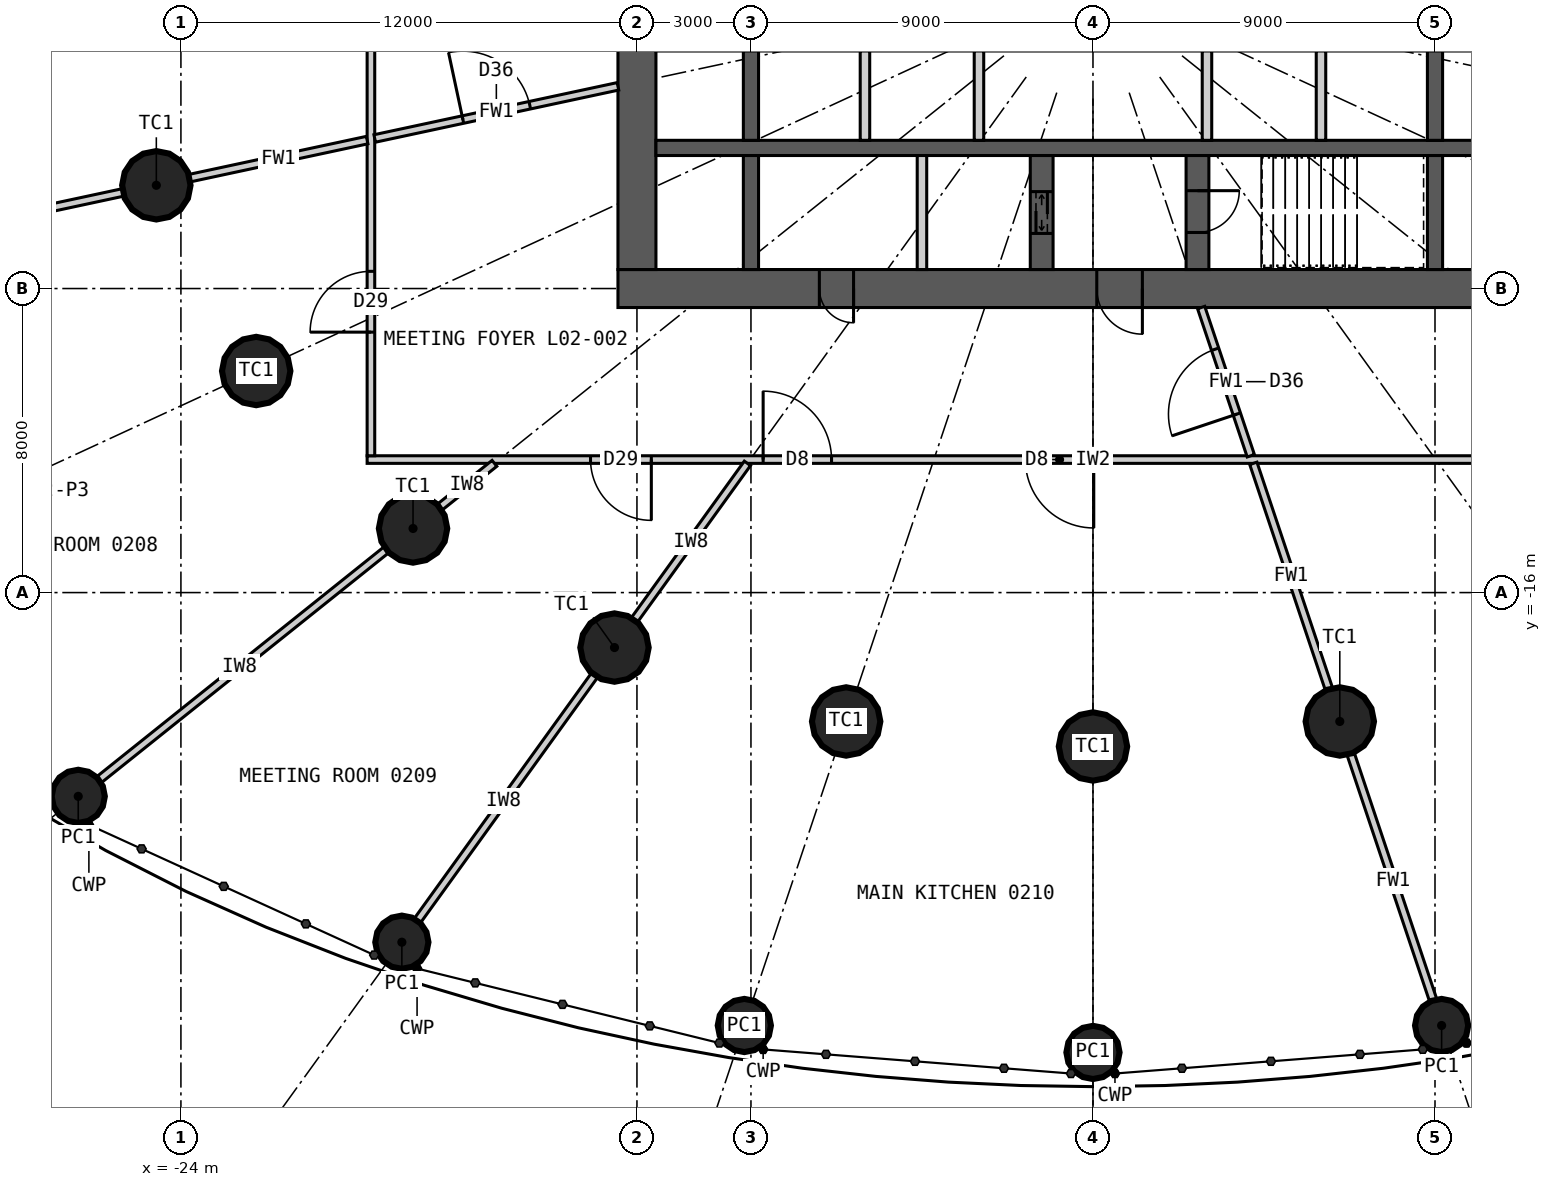
"""IFC4 building model, lengths in metres.
Left out: names, types, materials, properties, quantities, classifications, styles, units other than length and angle.
Written with IfcOpenShell. Run it as: python <this file> out.ifc"""

import sys

from ifc_helpers import new_model, si_unit, direction, frame, frame_2d, origin, origin_2d, place, context, subcontext, project, spatial, rectangle, circle, extrude, element, fill, save


model = new_model("IFC4")
c1 = context("Model", 3, precision=1e-05, world=origin(), true_north=direction((0.0, 1.0)))
c2 = subcontext(c1, "Body", "Model", "MODEL_VIEW")
j1 = project(units=[si_unit("LENGTHUNIT", "METRE"), si_unit("PLANEANGLEUNIT", "RADIAN")], contexts=[c1])
p1 = place(None, origin())
s1 = spatial("IfcSite", under=j1, at=p1, CompositionType="ELEMENT")
p2 = place(p1, origin())
s2 = spatial("IfcBuilding", under=s1, at=p2, CompositionType="ELEMENT")
p3 = place(p2, frame((0.0, 0.0, 13.8)))
s3 = spatial("IfcBuildingStorey", under=s2, at=p3, CompositionType="ELEMENT", Elevation=13.8)
for number, where, z_axis, x_axis in (
    (1, (-24.647, -5.283, 0.0), (0.0, 0.0, 1.0), (1.0, 0.0, 0.0)),
    (2, (-22.019, -10.17, 0.0), (0.0, 0.0, 1.0), (1.0, 0.0, 0.0)),
    (3, (-17.892, -14.313, 0.0), (0.0, 0.0, 1.0), (1.0, 0.0, 0.0)),
    (4, (-12.591, -17.447, 0.0), (0.0, 0.0, 1.0), (1.0, 0.0, 0.0)),
    (5, (-6.495, -19.391, 0.0), (0.0, 0.0, 1.0), (1.0, 0.0, 0.0)),
    (6, (0.0, -20.05, 0.0), (0.0, 0.0, 1.0), (1.0, 0.0, 0.0)),
    (7, (6.495, -19.391, 0.0), (0.0, 0.0, 1.0), (1.0, 0.0, 0.0)),
):
    element("IfcColumn", number, at=place(p3, frame(where, z_axis=z_axis, x_axis=x_axis)), inside=s3, PredefinedType="COLUMN", context=c2, shape_type="SweptSolid", body=[
        extrude(circle(Radius=0.9, at=origin_2d()), origin(), (0.0, 0.0, 1.0), 5.4),
    ])
for number, where, z_axis, x_axis in (
    (8, (-26.702, -21.362, 0.0), (0.0, 0.0, 1.0), (1.0, 0.0, 0.0)),
    (9, (-18.186, -25.199, 0.0), (0.0, 0.0, 1.0), (1.0, 0.0, 0.0)),
    (10, (-9.174, -27.391, 0.0), (0.0, 0.0, 1.0), (1.0, 0.0, 0.0)),
    (11, (0.0, -28.1, 0.0), (0.0, 0.0, 1.0), (1.0, 0.0, 0.0)),
    (12, (9.174, -27.391, 0.0), (0.0, 0.0, 1.0), (1.0, 0.0, 0.0)),
):
    element("IfcColumn", number, at=place(p3, frame(where, z_axis=z_axis, x_axis=x_axis)), inside=s3, PredefinedType="COLUMN", context=c2, shape_type="SweptSolid", body=[
        extrude(circle(Radius=0.7, at=origin_2d()), origin(), (0.0, 0.0, 1.0), 5.4),
    ])
p4 = place(p3, frame((12.5, -8.0, 0.0), z_axis=(0.0, 0.0, 1.0), x_axis=(-1.0, 0.0, 0.0)))
e13 = element("IfcWall", 13, at=p4, inside=s3, PredefinedType="SHEAR", context=c2, shape_type="SweptSolid", body=[
    extrude(rectangle(XDim=25.0, YDim=1.0, at=frame_2d((12.5, 0.0))), origin(), (0.0, 0.0, 1.0), 5.4),
])
p5 = place(p4, frame((11.2, 0.0, 0.0)))
e14 = element("IfcOpeningElement", 14, at=p5, cuts=e13, PredefinedType="OPENING", context=c2, shape_type="SweptSolid", body=[
    extrude(rectangle(XDim=1.2, YDim=2.2, at=frame_2d((0.6, 1.1))), frame((0.0, 0.51, 0.0), z_axis=(0.0, -1.0, 0.0), x_axis=(1.0, 0.0, 0.0)), (0.0, 0.0, 1.0), 1.02),
])
p6 = place(p4, frame((18.8, 0.0, 0.0)))
e15 = element("IfcOpeningElement", 15, at=p6, cuts=e13, PredefinedType="OPENING", context=c2, shape_type="SweptSolid", body=[
    extrude(rectangle(XDim=0.9, YDim=2.2, at=frame_2d((0.45, 1.1))), frame((0.0, 0.51, 0.0), z_axis=(0.0, -1.0, 0.0), x_axis=(1.0, 0.0, 0.0)), (0.0, 0.0, 1.0), 1.02),
])
p7 = place(p3, frame((-12.0, 7.5, 0.0), z_axis=(0.0, 0.0, 1.0), x_axis=(0.0, -1.0, 0.0)))
e16 = element("IfcWall", 16, at=p7, inside=s3, PredefinedType="SHEAR", context=c2, shape_type="SweptSolid", body=[
    extrude(rectangle(XDim=15.0, YDim=1.0, at=frame_2d((7.5, 0.0))), origin(), (0.0, 0.0, 1.0), 5.4),
])
p8 = place(p7, frame((6.6, 0.0, 0.0)))
e17 = element("IfcOpeningElement", 17, at=p8, cuts=e16, PredefinedType="OPENING", context=c2, shape_type="SweptSolid", body=[
    extrude(rectangle(XDim=1.8, YDim=2.2, at=frame_2d((0.9, 1.1))), frame((0.0, 0.51, 0.0), z_axis=(0.0, -1.0, 0.0), x_axis=(1.0, 0.0, 0.0)), (0.0, 0.0, 1.0), 1.02),
])
p9 = place(p3, frame((-11.5, -4.3, 0.0), z_axis=(0.0, 0.0, 1.0), x_axis=(1.0, 0.0, 0.0)))
e18 = element("IfcWall", 18, at=p9, inside=s3, PredefinedType="SHEAR", context=c2, shape_type="SweptSolid", body=[
    extrude(rectangle(XDim=23.0, YDim=0.4, at=frame_2d((11.5, 0.0))), origin(), (0.0, 0.0, 1.0), 5.4),
])
p10 = place(p3, frame((-9.0, -4.1, 0.0), z_axis=(0.0, 0.0, 1.0), x_axis=(0.0, 1.0, 0.0)))
e19 = element("IfcWall", 19, at=p10, inside=s3, PredefinedType="SHEAR", context=c2, shape_type="SweptSolid", body=[
    extrude(rectangle(XDim=2.35, YDim=0.4, at=frame_2d((1.175, 0.0))), origin(), (0.0, 0.0, 1.0), 5.4),
])
p11 = place(p3, frame((-9.0, -7.5, 0.0), z_axis=(0.0, 0.0, 1.0), x_axis=(0.0, 1.0, 0.0)))
e20 = element("IfcWall", 20, at=p11, inside=s3, PredefinedType="SHEAR", context=c2, shape_type="SweptSolid", body=[
    extrude(rectangle(XDim=3.0, YDim=0.4, at=frame_2d((1.5, 0.0))), origin(), (0.0, 0.0, 1.0), 5.4),
])
p12 = place(p3, frame((9.0, -4.1, 0.0), z_axis=(0.0, 0.0, 1.0), x_axis=(0.0, 1.0, 0.0)))
e21 = element("IfcWall", 21, at=p12, inside=s3, PredefinedType="SHEAR", context=c2, shape_type="SweptSolid", body=[
    extrude(rectangle(XDim=2.35, YDim=0.4, at=frame_2d((1.175, 0.0))), origin(), (0.0, 0.0, 1.0), 5.4),
])
p13 = place(p3, frame((9.0, -7.5, 0.0), z_axis=(0.0, 0.0, 1.0), x_axis=(0.0, 1.0, 0.0)))
e22 = element("IfcWall", 22, at=p13, inside=s3, PredefinedType="SHEAR", context=c2, shape_type="SweptSolid", body=[
    extrude(rectangle(XDim=3.0, YDim=0.4, at=frame_2d((1.5, 0.0))), origin(), (0.0, 0.0, 1.0), 5.4),
])
p14 = place(p3, frame((2.75, -7.5, 0.0), z_axis=(0.0, 0.0, 1.0), x_axis=(0.0, 1.0, 0.0)))
e23 = element("IfcWall", 23, at=p14, inside=s3, PredefinedType="SHEAR", context=c2, shape_type="SweptSolid", body=[
    extrude(rectangle(XDim=3.0, YDim=0.6, at=frame_2d((1.5, 0.0))), origin(), (0.0, 0.0, 1.0), 5.4),
])
p15 = place(p14, frame((0.975, 0.0, 0.0)))
e24 = element("IfcOpeningElement", 24, at=p15, cuts=e23, PredefinedType="OPENING", context=c2, shape_type="SweptSolid", body=[
    extrude(rectangle(XDim=1.1, YDim=2.2, at=frame_2d((0.55, 1.1))), frame((0.0, 0.31, 0.0), z_axis=(0.0, -1.0, 0.0), x_axis=(1.0, 0.0, 0.0)), (0.0, 0.0, 1.0), 0.62),
])
p16 = place(p3, frame((-1.35, -7.5, 0.0), z_axis=(0.0, 0.0, 1.0), x_axis=(0.0, 1.0, 0.0)))
e25 = element("IfcWall", 25, at=p16, inside=s3, PredefinedType="SHEAR", context=c2, shape_type="SweptSolid", body=[
    extrude(rectangle(XDim=3.0, YDim=0.6, at=frame_2d((1.5, 0.0))), origin(), (0.0, 0.0, 1.0), 5.4),
])
p17 = place(p16, frame((0.95, 0.0, 0.0)))
e26 = element("IfcOpeningElement", 26, at=p17, cuts=e25, PredefinedType="OPENING", context=c2, shape_type="SweptSolid", body=[
    extrude(rectangle(XDim=1.1, YDim=2.2, at=frame_2d((0.55, 1.1))), frame((0.0, 0.31, 0.0), z_axis=(0.0, -1.0, 0.0), x_axis=(1.0, 0.0, 0.0)), (0.0, 0.0, 1.0), 0.62),
])
p18 = place(p3, frame((-4.5, -7.5, 0.0), z_axis=(0.0, 0.0, 1.0), x_axis=(0.0, 1.0, 0.0)))
e27 = element("IfcWall", 27, at=p18, inside=s3, PredefinedType="PARTITIONING", context=c2, shape_type="SweptSolid", body=[
    extrude(rectangle(XDim=3.0, YDim=0.25, at=frame_2d((1.5, 0.0))), origin(), (0.0, 0.0, 1.0), 5.4),
])
for number, where, z_axis, x_axis in (
    (28, (-6.0, -4.1, 0.0), (0.0, 0.0, 1.0), (0.0, 1.0, 0.0)),
    (29, (-3.0, -4.1, 0.0), (0.0, 0.0, 1.0), (0.0, 1.0, 0.0)),
    (30, (3.0, -4.1, 0.0), (0.0, 0.0, 1.0), (0.0, 1.0, 0.0)),
    (31, (6.0, -4.1, 0.0), (0.0, 0.0, 1.0), (0.0, 1.0, 0.0)),
):
    element("IfcWall", number, at=place(p3, frame(where, z_axis=z_axis, x_axis=x_axis)), inside=s3, PredefinedType="PARTITIONING", context=c2, shape_type="SweptSolid", body=[
        extrude(rectangle(XDim=2.35, YDim=0.25, at=frame_2d((1.175, 0.0))), origin(), (0.0, 0.0, 1.0), 5.4),
    ])
p19 = place(p3, frame((19.1, -12.5, 0.0), z_axis=(0.0, 0.0, 1.0), x_axis=(-1.0, 0.0, 0.0)))
e32 = element("IfcWall", 32, at=p19, inside=s3, PredefinedType="PARTITIONING", context=c2, shape_type="SweptSolid", body=[
    extrude(rectangle(XDim=38.2, YDim=0.2, at=frame_2d((19.1, 0.0))), origin(), (0.0, 0.0, 1.0), 5.15),
])
p20 = place(p19, frame((30.722, 0.0, 0.0)))
e33 = element("IfcOpeningElement", 33, at=p20, cuts=e32, PredefinedType="OPENING", context=c2, shape_type="SweptSolid", body=[
    extrude(rectangle(XDim=1.6, YDim=2.4, at=frame_2d((0.8, 1.2))), frame((0.0, 0.11, 0.0), z_axis=(0.0, -1.0, 0.0), x_axis=(1.0, 0.0, 0.0)), (0.0, 0.0, 1.0), 0.22),
])
p21 = place(p19, frame((19.079, 0.0, 0.0)))
e34 = element("IfcOpeningElement", 34, at=p21, cuts=e32, PredefinedType="OPENING", context=c2, shape_type="SweptSolid", body=[
    extrude(rectangle(XDim=1.8, YDim=2.4, at=frame_2d((0.9, 1.2))), frame((0.0, 0.11, 0.0), z_axis=(0.0, -1.0, 0.0), x_axis=(1.0, 0.0, 0.0)), (0.0, 0.0, 1.0), 0.22),
])
p22 = place(p19, frame((25.979, 0.0, 0.0)))
e35 = element("IfcOpeningElement", 35, at=p22, cuts=e32, PredefinedType="OPENING", context=c2, shape_type="SweptSolid", body=[
    extrude(rectangle(XDim=1.8, YDim=2.4, at=frame_2d((0.9, 1.2))), frame((0.0, 0.11, 0.0), z_axis=(0.0, -1.0, 0.0), x_axis=(1.0, 0.0, 0.0)), (0.0, 0.0, 1.0), 0.22),
])
p23 = place(p3, frame((-19.0, 12.4, 0.0), z_axis=(0.0, 0.0, 1.0), x_axis=(0.0, -1.0, 0.0)))
e36 = element("IfcWall", 36, at=p23, inside=s3, PredefinedType="PARTITIONING", context=c2, shape_type="SweptSolid", body=[
    extrude(rectangle(XDim=24.8, YDim=0.2, at=frame_2d((12.4, 0.0))), origin(), (0.0, 0.0, 1.0), 5.15),
])
p24 = place(p23, frame((9.436, 0.0, 0.0)))
e37 = element("IfcOpeningElement", 37, at=p24, cuts=e36, PredefinedType="OPENING", context=c2, shape_type="SweptSolid", body=[
    extrude(rectangle(XDim=1.2, YDim=2.2, at=frame_2d((0.6, 1.1))), frame((0.0, 0.11, 0.0), z_axis=(0.0, -1.0, 0.0), x_axis=(1.0, 0.0, 0.0)), (0.0, 0.0, 1.0), 0.22),
])
p25 = place(p23, frame((19.947, 0.0, 0.0)))
e38 = element("IfcOpeningElement", 38, at=p25, cuts=e36, PredefinedType="OPENING", context=c2, shape_type="SweptSolid", body=[
    extrude(rectangle(XDim=1.6, YDim=2.4, at=frame_2d((0.8, 1.2))), frame((0.0, 0.11, 0.0), z_axis=(0.0, -1.0, 0.0), x_axis=(1.0, 0.0, 0.0)), (0.0, 0.0, 1.0), 0.22),
])
p26 = place(p23, frame((1.0, 0.0, 0.0)))
e39 = element("IfcOpeningElement", 39, at=p26, cuts=e36, PredefinedType="OPENING", context=c2, shape_type="SweptSolid", body=[
    extrude(rectangle(XDim=1.6, YDim=2.4, at=frame_2d((0.8, 1.2))), frame((0.0, 0.11, 0.0), z_axis=(0.0, -1.0, 0.0), x_axis=(1.0, 0.0, 0.0)), (0.0, 0.0, 1.0), 0.22),
])
p27 = place(p3, frame((-19.1, -4.094, 0.0), z_axis=(0.0, 0.0, 1.0), x_axis=(-0.977784445586, -0.209612924148, 0.0)))
e40 = element("IfcWall", 40, at=p27, inside=s3, PredefinedType="PARTITIONING", context=c2, shape_type="SweptSolid", body=[
    extrude(rectangle(XDim=4.773, YDim=0.2, at=frame_2d((2.386, 0.0))), origin(), (0.0, 0.0, 1.0), 4.3),
])
p28 = place(p3, frame((-25.527, -5.472, 0.0), z_axis=(0.0, 0.0, 1.0), x_axis=(-0.977787143577, -0.209600338396, 0.0)))
e41 = element("IfcWall", 41, at=p28, inside=s3, PredefinedType="PARTITIONING", context=c2, shape_type="SweptSolid", body=[
    extrude(rectangle(XDim=4.68, YDim=0.2, at=frame_2d((2.34, 0.0))), origin(), (0.0, 0.0, 1.0), 4.25),
])
p29 = place(p3, frame((-15.75, -12.6, 0.0), z_axis=(0.0, 0.0, 1.0), x_axis=(-0.780881734892, -0.6246788904, 0.0)))
e42 = element("IfcWall", 42, at=p29, inside=s3, PredefinedType="PARTITIONING", context=c2, shape_type="SweptSolid", body=[
    extrude(rectangle(XDim=1.843, YDim=0.2, at=frame_2d((0.921, 0.0))), origin(), (0.0, 0.0, 1.0), 4.3),
])
p30 = place(p3, frame((-18.594, -14.875, 0.0), z_axis=(0.0, 0.0, 1.0), x_axis=(-0.780868809443, -0.624695047554, 0.0)))
e43 = element("IfcWall", 43, at=p30, inside=s3, PredefinedType="PARTITIONING", context=c2, shape_type="SweptSolid", body=[
    extrude(rectangle(XDim=9.883, YDim=0.2, at=frame_2d((4.941, 0.0))), origin(), (0.0, 0.0, 1.0), 4.25),
])
p31 = place(p3, frame((-9.093, -12.6, 0.0), z_axis=(0.0, 0.0, 1.0), x_axis=(-0.58522538525, -0.810870673079, 0.0)))
e44 = element("IfcWall", 44, at=p31, inside=s3, PredefinedType="PARTITIONING", context=c2, shape_type="SweptSolid", body=[
    extrude(rectangle(XDim=5.077, YDim=0.2, at=frame_2d((2.538, 0.0))), origin(), (0.0, 0.0, 1.0), 4.3),
])
p32 = place(p3, frame((-13.118, -18.176, 0.0), z_axis=(0.0, 0.0, 1.0), x_axis=(-0.585204349301, -0.810885854828, 0.0)))
e45 = element("IfcWall", 45, at=p32, inside=s3, PredefinedType="PARTITIONING", context=c2, shape_type="SweptSolid", body=[
    extrude(rectangle(XDim=8.161, YDim=0.2, at=frame_2d((4.081, 0.0))), origin(), (0.0, 0.0, 1.0), 4.25),
])
p33 = place(p3, frame((4.22, -12.6, 0.0), z_axis=(0.0, 0.0, 1.0), x_axis=(0.317584173452, -0.9482300843, 0.0)))
e46 = element("IfcWall", 46, at=p33, inside=s3, PredefinedType="PARTITIONING", context=c2, shape_type="SweptSolid", body=[
    extrude(rectangle(XDim=6.262, YDim=0.2, at=frame_2d((3.131, 0.0))), origin(), (0.0, 0.0, 1.0), 4.3),
])
p34 = place(p3, frame((6.781, -20.245, 0.0), z_axis=(0.0, 0.0, 1.0), x_axis=(0.317580622989, -0.948231273425, 0.0)))
e47 = element("IfcWall", 47, at=p34, inside=s3, PredefinedType="PARTITIONING", context=c2, shape_type="SweptSolid", body=[
    extrude(rectangle(XDim=7.036, YDim=0.2, at=frame_2d((3.518, 0.0))), origin(), (0.0, 0.0, 1.0), 4.25),
])
p35 = place(p3, frame((-18.9, -4.052, 0.0), z_axis=(0.0, 0.0, 1.0), x_axis=(0.977781666858, 0.2096258857, 0.0)))
e48 = element("IfcWall", 48, at=p35, inside=s3, PredefinedType="PARTITIONING", context=c2, shape_type="SweptSolid", body=[
    extrude(rectangle(XDim=6.545, YDim=0.2, at=frame_2d((3.273, 0.0))), origin(), (0.0, 0.0, 1.0), 5.15),
])
p36 = place(p35, frame((2.373, 0.0, 0.0)))
e49 = element("IfcOpeningElement", 49, at=p36, cuts=e48, PredefinedType="OPENING", context=c2, shape_type="SweptSolid", body=[
    extrude(rectangle(XDim=1.8, YDim=2.4, at=frame_2d((0.9, 1.2))), frame((0.0, 0.11, 0.0), z_axis=(0.0, -1.0, 0.0), x_axis=(1.0, 0.0, 0.0)), (0.0, 0.0, 1.0), 0.22),
])
p37 = place(p3, frame((4.153, -12.4, 0.0), z_axis=(0.0, 0.0, 1.0), x_axis=(-0.317634245377, 0.948213312585, 0.0)))
e50 = element("IfcWall", 50, at=p37, inside=s3, PredefinedType="PARTITIONING", context=c2, shape_type="SweptSolid", body=[
    extrude(rectangle(XDim=4.113, YDim=0.2, at=frame_2d((2.056, 0.0))), origin(), (0.0, 0.0, 1.0), 5.15),
])
p38 = place(p37, frame((1.156, 0.0, 0.0)))
e51 = element("IfcOpeningElement", 51, at=p38, cuts=e50, PredefinedType="OPENING", context=c2, shape_type="SweptSolid", body=[
    extrude(rectangle(XDim=1.8, YDim=2.4, at=frame_2d((0.9, 1.2))), frame((0.0, 0.11, 0.0), z_axis=(0.0, -1.0, 0.0), x_axis=(1.0, 0.0, 0.0)), (0.0, 0.0, 1.0), 0.22),
])
p39 = place(p25, origin())
e52 = element("IfcDoor", 52, at=p39, inside=s3, OperationType="DOUBLE_DOOR_DOUBLE_SWING", PredefinedType="DOOR", context=c2, shape_type="SweptSolid", body=[
    extrude(rectangle(XDim=1.6, YDim=2.4, at=frame_2d((0.8, 1.2))), frame((0.0, 0.025, 0.0), z_axis=(0.0, -1.0, 0.0), x_axis=(1.0, 0.0, 0.0)), (0.0, 0.0, 1.0), 0.05),
])
fill(e38, e52)
p40 = place(p20, origin())
e53 = element("IfcDoor", 53, at=p40, inside=s3, OperationType="DOUBLE_DOOR_DOUBLE_SWING", PredefinedType="DOOR", context=c2, shape_type="SweptSolid", body=[
    extrude(rectangle(XDim=1.6, YDim=2.4, at=frame_2d((0.8, 1.2))), frame((0.0, 0.025, 0.0), z_axis=(0.0, -1.0, 0.0), x_axis=(1.0, 0.0, 0.0)), (0.0, 0.0, 1.0), 0.05),
])
fill(e33, e53)
p41 = place(p21, origin())
e54 = element("IfcDoor", 54, at=p41, inside=s3, OperationType="DOUBLE_DOOR_DOUBLE_SWING", PredefinedType="DOOR", context=c2, shape_type="SweptSolid", body=[
    extrude(rectangle(XDim=1.8, YDim=2.4, at=frame_2d((0.9, 1.2))), frame((0.0, 0.025, 0.0), z_axis=(0.0, -1.0, 0.0), x_axis=(1.0, 0.0, 0.0)), (0.0, 0.0, 1.0), 0.05),
])
fill(e34, e54)
p42 = place(p36, origin())
e55 = element("IfcDoor", 55, at=p42, inside=s3, OperationType="DOUBLE_DOOR_DOUBLE_SWING", PredefinedType="DOOR", context=c2, shape_type="SweptSolid", body=[
    extrude(rectangle(XDim=1.8, YDim=2.4, at=frame_2d((0.9, 1.2))), frame((0.0, 0.025, 0.0), z_axis=(0.0, -1.0, 0.0), x_axis=(1.0, 0.0, 0.0)), (0.0, 0.0, 1.0), 0.05),
])
fill(e49, e55)
p43 = place(p38, origin())
e56 = element("IfcDoor", 56, at=p43, inside=s3, OperationType="DOUBLE_DOOR_DOUBLE_SWING", PredefinedType="DOOR", context=c2, shape_type="SweptSolid", body=[
    extrude(rectangle(XDim=1.8, YDim=2.4, at=frame_2d((0.9, 1.2))), frame((0.0, 0.025, 0.0), z_axis=(0.0, -1.0, 0.0), x_axis=(1.0, 0.0, 0.0)), (0.0, 0.0, 1.0), 0.05),
])
fill(e51, e56)
p44 = place(p5, origin())
e57 = element("IfcDoor", 57, at=p44, inside=s3, OperationType="SINGLE_SWING_LEFT", PredefinedType="DOOR", context=c2, shape_type="SweptSolid", body=[
    extrude(rectangle(XDim=1.2, YDim=2.2, at=frame_2d((0.6, 1.1))), frame((0.0, 0.025, 0.0), z_axis=(0.0, -1.0, 0.0), x_axis=(1.0, 0.0, 0.0)), (0.0, 0.0, 1.0), 0.05),
])
fill(e14, e57)
p45 = place(p15, origin())
e58 = element("IfcDoor", 58, at=p45, inside=s3, OperationType="SINGLE_SWING_RIGHT", PredefinedType="DOOR", context=c2, shape_type="SweptSolid", body=[
    extrude(rectangle(XDim=1.1, YDim=2.2, at=frame_2d((0.55, 1.1))), frame((0.0, 0.025, 0.0), z_axis=(0.0, -1.0, 0.0), x_axis=(1.0, 0.0, 0.0)), (0.0, 0.0, 1.0), 0.05),
])
fill(e24, e58)
p46 = place(p17, origin())
e59 = element("IfcDoor", 59, at=p46, inside=s3, OperationType="DOUBLE_DOOR_SLIDING", PredefinedType="DOOR", context=c2, shape_type="SweptSolid", body=[
    extrude(rectangle(XDim=1.1, YDim=2.2, at=frame_2d((0.55, 1.1))), frame((0.0, 0.025, 0.0), z_axis=(0.0, -1.0, 0.0), x_axis=(1.0, 0.0, 0.0)), (0.0, 0.0, 1.0), 0.05),
])
fill(e26, e59)
p47 = place(p6, origin())
e60 = element("IfcDoor", 60, at=p47, inside=s3, OperationType="SINGLE_SWING_LEFT", PredefinedType="DOOR", context=c2, shape_type="SweptSolid", body=[
    extrude(rectangle(XDim=0.9, YDim=2.2, at=frame_2d((0.45, 1.1))), frame((0.0, 0.025, 0.0), z_axis=(0.0, -1.0, 0.0), x_axis=(1.0, 0.0, 0.0)), (0.0, 0.0, 1.0), 0.05),
])
fill(e15, e60)
p48 = place(p22, origin())
e61 = element("IfcDoor", 61, at=p48, inside=s3, OperationType="DOUBLE_DOOR_DOUBLE_SWING", PredefinedType="DOOR", context=c2, shape_type="SweptSolid", body=[
    extrude(rectangle(XDim=1.8, YDim=2.4, at=frame_2d((0.9, 1.2))), frame((0.0, 0.025, 0.0), z_axis=(0.0, -1.0, 0.0), x_axis=(1.0, 0.0, 0.0)), (0.0, 0.0, 1.0), 0.05),
])
fill(e35, e61)
save(model, sys.argv[1])
